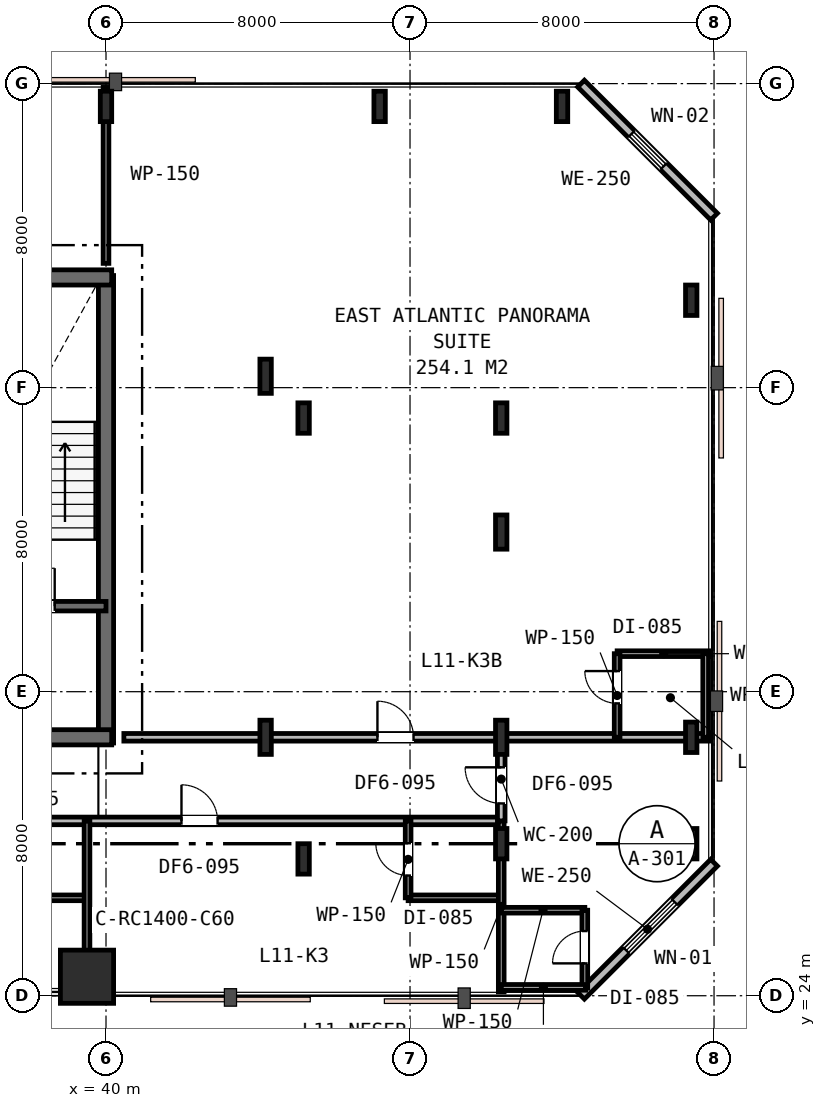
"""IFC4 building model, lengths in metres.
Left out: names, types, materials, properties, quantities, classifications, styles, units other than length and angle.
Written with IfcOpenShell. Run it as: python <this file> out.ifc"""

import sys

from ifc_helpers import new_model, si_unit, direction, frame, frame_2d, origin, origin_2d, place, context, subcontext, project, spatial, rectangle, i_section, extrude, element, fill, save


model = new_model("IFC4")
c1 = context("Model", 3, precision=1e-05, world=origin(), true_north=direction((0.0, 1.0)))
c2 = subcontext(c1, "Body", "Model", "MODEL_VIEW")
j1 = project(units=[si_unit("LENGTHUNIT", "METRE"), si_unit("PLANEANGLEUNIT", "RADIAN")], contexts=[c1])
p1 = place(None, origin())
s1 = spatial("IfcSite", under=j1, at=p1, CompositionType="ELEMENT")
p2 = place(p1, origin())
s2 = spatial("IfcBuilding", under=s1, at=p2, CompositionType="ELEMENT")
p3 = place(p2, frame((0.0, 0.0, 47.4)))
s3 = spatial("IfcBuildingStorey", under=s2, at=p3, CompositionType="ELEMENT", Elevation=47.4)
p4 = place(p3, frame((40.0, 30.65, 0.0), z_axis=(0.0, 0.0, 1.0), x_axis=(0.0, 1.0, 0.0)))
e1 = element("IfcWall", 1, at=p4, inside=s3, PredefinedType="SHEAR", context=c2, shape_type="SweptSolid", body=[
    extrude(rectangle(XDim=12.3, YDim=0.4, at=frame_2d((6.15, 0.0))), origin(), (0.0, 0.0, 1.0), 3.6),
])
p5 = place(p3, frame((15.85, 42.9, 0.0), z_axis=(0.0, 0.0, 1.0), x_axis=(1.0, 0.0, 0.0)))
e2 = element("IfcWall", 2, at=p5, inside=s3, PredefinedType="SHEAR", context=c2, shape_type="SweptSolid", body=[
    extrude(rectangle(XDim=24.3, YDim=0.4, at=frame_2d((12.15, 0.0))), origin(), (0.0, 0.0, 1.0), 3.6),
])
p6 = place(p3, frame((28.95, 30.8, 0.0), z_axis=(0.0, 0.0, 1.0), x_axis=(1.0, 0.0, 0.0)))
e3 = element("IfcWall", 3, at=p6, inside=s3, PredefinedType="SHEAR", context=c2, shape_type="SweptSolid", body=[
    extrude(rectangle(XDim=11.2, YDim=0.4, at=frame_2d((5.6, 0.0))), origin(), (0.0, 0.0, 1.0), 3.6),
])
p7 = place(p6, frame((7.65, 0.0, 0.0)))
e4 = element("IfcOpeningElement", 4, at=p7, cuts=e3, PredefinedType="OPENING", context=c2, shape_type="SweptSolid", body=[
    extrude(rectangle(XDim=1.1, YDim=2.15, at=frame_2d((0.55, 1.075))), frame((0.0, 0.21, 0.0), z_axis=(0.0, -1.0, 0.0), x_axis=(1.0, 0.0, 0.0)), (0.0, 0.0, 1.0), 0.42),
])
p8 = place(p3, frame((33.95, 34.25, 0.0), z_axis=(0.0, 0.0, 1.0), x_axis=(1.0, 0.0, 0.0)))
e5 = element("IfcWall", 5, at=p8, inside=s3, PredefinedType="SHEAR", context=c2, shape_type="SweptSolid", body=[
    extrude(rectangle(XDim=6.05, YDim=0.25, at=frame_2d((3.025, 0.0))), origin(), (0.0, 0.0, 1.0), 3.6),
])
p9 = place(p8, frame((3.7, 0.0, 0.0)))
e6 = element("IfcOpeningElement", 6, at=p9, cuts=e5, PredefinedType="OPENING", context=c2, shape_type="SweptSolid", body=[
    extrude(rectangle(XDim=1.0, YDim=2.15, at=frame_2d((0.5, 1.075))), frame((0.0, 0.135, 0.0), z_axis=(0.0, -1.0, 0.0), x_axis=(1.0, 0.0, 0.0)), (0.0, 0.0, 1.0), 0.27),
])
p10 = place(p8, frame((0.55, 0.0, 0.0)))
e7 = element("IfcOpeningElement", 7, at=p10, cuts=e5, PredefinedType="OPENING", context=c2, shape_type="SweptSolid", body=[
    extrude(rectangle(XDim=1.1, YDim=2.15, at=frame_2d((0.55, 1.075))), frame((0.0, 0.135, 0.0), z_axis=(0.0, -1.0, 0.0), x_axis=(1.0, 0.0, 0.0)), (0.0, 0.0, 1.0), 0.27),
])
p11 = place(p3, frame((39.5, 24.5, 0.0), z_axis=(0.0, 0.0, 1.0), x_axis=(1.0, 0.0, 0.0)))
e8 = element("IfcColumn", 8, at=p11, inside=s3, PredefinedType="COLUMN", context=c2, shape_type="SweptSolid", body=[
    extrude(rectangle(XDim=1.4, YDim=1.4, at=origin_2d()), origin(), (0.0, 0.0, 1.0), 3.6),
])
for number, where, z_axis, x_axis in (
    (9, (45.2, 27.6, 0.0), (0.0, 0.0, 1.0), (1.0, 0.0, 0.0)),
    (10, (45.2, 39.2, 0.0), (0.0, 0.0, 1.0), (1.0, 0.0, 0.0)),
    (11, (40.0, 47.4, 0.0), (0.0, 0.0, 1.0), (1.0, 0.0, 0.0)),
    (12, (47.2, 47.4, 0.0), (0.0, 0.0, 1.0), (1.0, 0.0, 0.0)),
    (13, (50.4, 28.0, 0.0), (0.0, 0.0, 1.0), (1.0, 0.0, 0.0)),
    (14, (50.4, 39.2, 0.0), (0.0, 0.0, 1.0), (1.0, 0.0, 0.0)),
    (15, (55.4, 28.0, 0.0), (0.0, 0.0, 1.0), (1.0, 0.0, 0.0)),
    (16, (55.4, 30.8, 0.0), (0.0, 0.0, 1.0), (1.0, 0.0, 0.0)),
    (17, (55.4, 42.3, 0.0), (0.0, 0.0, 1.0), (1.0, 0.0, 0.0)),
    (18, (52.0, 47.4, 0.0), (0.0, 0.0, 1.0), (1.0, 0.0, 0.0)),
):
    element("IfcColumn", number, at=place(p3, frame(where, z_axis=z_axis, x_axis=x_axis)), inside=s3, PredefinedType="COLUMN", context=c2, shape_type="SweptSolid", body=[
        extrude(i_section(OverallWidth=0.3, OverallDepth=0.8, WebThickness=0.018, FlangeThickness=0.033, FilletRadius=0.03, at=origin_2d()), origin(), (0.0, 0.0, 1.0), 3.6),
    ])
for number, where, z_axis, x_axis in (
    (19, (44.2, 30.8, 0.0), (0.0, 0.0, 1.0), (1.0, 0.0, 0.0)),
    (20, (44.2, 40.3, 0.0), (0.0, 0.0, 1.0), (1.0, 0.0, 0.0)),
    (21, (50.4, 30.8, 0.0), (0.0, 0.0, 1.0), (1.0, 0.0, 0.0)),
    (22, (50.4, 36.2, 0.0), (0.0, 0.0, 1.0), (1.0, 0.0, 0.0)),
):
    element("IfcColumn", number, at=place(p3, frame(where, z_axis=z_axis, x_axis=x_axis)), inside=s3, PredefinedType="COLUMN", context=c2, shape_type="SweptSolid", body=[
        extrude(i_section(OverallWidth=0.3, OverallDepth=0.9, WebThickness=0.018, FlangeThickness=0.035, FilletRadius=0.03, at=origin_2d()), origin(), (0.0, 0.0, 1.0), 3.6),
    ])
p12 = place(p3, frame((52.5, 24.0, 0.0), z_axis=(0.0, 0.0, 1.0), x_axis=(0.707106781187, 0.707106781187, 0.0)))
e23 = element("IfcWall", 23, at=p12, inside=s3, PredefinedType="STANDARD", context=c2, shape_type="SweptSolid", body=[
    extrude(rectangle(XDim=4.95, YDim=0.25, at=frame_2d((2.475, 0.0))), origin(), (0.0, 0.0, 1.0), 3.33),
])
p13 = place(p12, frame((1.685, 0.0, 0.75)))
e24 = element("IfcOpeningElement", 24, at=p13, cuts=e23, PredefinedType="OPENING", context=c2, shape_type="SweptSolid", body=[
    extrude(rectangle(XDim=1.8, YDim=1.85, at=frame_2d((0.9, 0.925))), frame((0.0, 0.135, 0.0), z_axis=(0.0, -1.0, 0.0), x_axis=(1.0, 0.0, 0.0)), (0.0, 0.0, 1.0), 0.27),
])
p14 = place(p3, frame((56.0, 44.5, 0.0), z_axis=(0.0, 0.0, 1.0), x_axis=(-0.707106781187, 0.707106781187, 0.0)))
e25 = element("IfcWall", 25, at=p14, inside=s3, PredefinedType="STANDARD", context=c2, shape_type="SweptSolid", body=[
    extrude(rectangle(XDim=4.95, YDim=0.25, at=frame_2d((2.475, 0.0))), origin(), (0.0, 0.0, 1.0), 3.33),
])
p15 = place(p14, frame((1.875, 0.0, 0.85)))
e26 = element("IfcOpeningElement", 26, at=p15, cuts=e25, PredefinedType="OPENING", context=c2, shape_type="SweptSolid", body=[
    extrude(rectangle(XDim=1.2, YDim=1.6, at=frame_2d((0.6, 0.8))), frame((0.0, 0.135, 0.0), z_axis=(0.0, -1.0, 0.0), x_axis=(1.0, 0.0, 0.0)), (0.0, 0.0, 1.0), 0.27),
])
p16 = place(p3, frame((21.8, 28.6, 0.0), z_axis=(0.0, 0.0, 1.0), x_axis=(1.0, 0.0, 0.0)))
e27 = element("IfcWall", 27, at=p16, inside=s3, PredefinedType="PARTITIONING", context=c2, shape_type="SweptSolid", body=[
    extrude(rectangle(XDim=28.6, YDim=0.2, at=frame_2d((14.3, 0.0))), origin(), (0.0, 0.0, 1.0), 2.82),
])
p17 = place(p16, frame((4.3, 0.0, 0.0)))
e28 = element("IfcOpeningElement", 28, at=p17, cuts=e27, PredefinedType="OPENING", context=c2, shape_type="SweptSolid", body=[
    extrude(rectangle(XDim=0.95, YDim=2.15, at=frame_2d((0.475, 1.075))), frame((0.0, 0.11, 0.0), z_axis=(0.0, -1.0, 0.0), x_axis=(1.0, 0.0, 0.0)), (0.0, 0.0, 1.0), 0.22),
])
p18 = place(p16, frame((12.075, 0.0, 0.0)))
e29 = element("IfcOpeningElement", 29, at=p18, cuts=e27, PredefinedType="OPENING", context=c2, shape_type="SweptSolid", body=[
    extrude(rectangle(XDim=0.95, YDim=2.15, at=frame_2d((0.475, 1.075))), frame((0.0, 0.11, 0.0), z_axis=(0.0, -1.0, 0.0), x_axis=(1.0, 0.0, 0.0)), (0.0, 0.0, 1.0), 0.22),
])
p19 = place(p16, frame((20.186, 0.0, 0.0)))
e30 = element("IfcOpeningElement", 30, at=p19, cuts=e27, PredefinedType="OPENING", context=c2, shape_type="SweptSolid", body=[
    extrude(rectangle(XDim=0.95, YDim=2.15, at=frame_2d((0.475, 1.075))), frame((0.0, 0.11, 0.0), z_axis=(0.0, -1.0, 0.0), x_axis=(1.0, 0.0, 0.0)), (0.0, 0.0, 1.0), 0.22),
])
p20 = place(p3, frame((40.0, 43.27, 0.0), z_axis=(0.0, 0.0, 1.0), x_axis=(0.0, 1.0, 0.0)))
e31 = element("IfcWall", 31, at=p20, inside=s3, PredefinedType="PARTITIONING", context=c2, shape_type="SweptSolid", body=[
    extrude(rectangle(XDim=4.63, YDim=0.15, at=frame_2d((2.315, 0.0))), origin(), (0.0, 0.0, 1.0), 2.93),
])
p21 = place(p3, frame((37.05, 26.576, 0.0), z_axis=(0.0, 0.0, 1.0), x_axis=(1.0, 0.0, 0.0)))
e32 = element("IfcWall", 32, at=p21, inside=s3, PredefinedType="PARTITIONING", context=c2, shape_type="SweptSolid", body=[
    extrude(rectangle(XDim=2.45, YDim=0.15, at=frame_2d((1.225, 0.0))), origin(), (0.0, 0.0, 1.0), 2.82),
])
p22 = place(p3, frame((39.5, 28.6, 0.0), z_axis=(0.0, 0.0, 1.0), x_axis=(0.0, -1.0, 0.0)))
e33 = element("IfcWall", 33, at=p22, inside=s3, PredefinedType="PARTITIONING", context=c2, shape_type="SweptSolid", body=[
    extrude(rectangle(XDim=4.5, YDim=0.15, at=frame_2d((2.25, 0.0))), origin(), (0.0, 0.0, 1.0), 2.82),
])
p23 = place(p3, frame((47.95, 26.576, 0.0), z_axis=(0.0, 0.0, 1.0), x_axis=(1.0, 0.0, 0.0)))
e34 = element("IfcWall", 34, at=p23, inside=s3, PredefinedType="PARTITIONING", context=c2, shape_type="SweptSolid", body=[
    extrude(rectangle(XDim=2.45, YDim=0.15, at=frame_2d((1.225, 0.0))), origin(), (0.0, 0.0, 1.0), 3.33),
])
p24 = place(p3, frame((47.95, 26.576, 0.0), z_axis=(0.0, 0.0, 1.0), x_axis=(0.0, 1.0, 0.0)))
e35 = element("IfcWall", 35, at=p24, inside=s3, PredefinedType="PARTITIONING", context=c2, shape_type="SweptSolid", body=[
    extrude(rectangle(XDim=2.024, YDim=0.15, at=frame_2d((1.012, 0.0))), origin(), (0.0, 0.0, 1.0), 3.33),
])
p25 = place(p24, frame((0.587, 0.0, 0.0)))
e36 = element("IfcOpeningElement", 36, at=p25, cuts=e35, PredefinedType="OPENING", context=c2, shape_type="SweptSolid", body=[
    extrude(rectangle(XDim=0.85, YDim=2.15, at=frame_2d((0.425, 1.075))), frame((0.0, 0.085, 0.0), z_axis=(0.0, -1.0, 0.0), x_axis=(1.0, 0.0, 0.0)), (0.0, 0.0, 1.0), 0.17),
])
p26 = place(p3, frame((50.4, 28.6, 0.0), z_axis=(0.0, 0.0, 1.0), x_axis=(0.0, -1.0, 0.0)))
e37 = element("IfcWall", 37, at=p26, inside=s3, PredefinedType="PARTITIONING", context=c2, shape_type="SweptSolid", body=[
    extrude(rectangle(XDim=4.5, YDim=0.15, at=frame_2d((2.25, 0.0))), origin(), (0.0, 0.0, 1.0), 2.82),
])
p27 = place(p3, frame((40.47, 30.8, 0.0), z_axis=(0.0, 0.0, 1.0), x_axis=(1.0, 0.0, 0.0)))
e38 = element("IfcWall", 38, at=p27, inside=s3, PredefinedType="PARTITIONING", context=c2, shape_type="SweptSolid", body=[
    extrude(rectangle(XDim=15.43, YDim=0.2, at=frame_2d((7.715, 0.0))), origin(), (0.0, 0.0, 1.0), 2.82),
])
p28 = place(p27, frame((6.673, 0.0, 0.0)))
e39 = element("IfcOpeningElement", 39, at=p28, cuts=e38, PredefinedType="OPENING", context=c2, shape_type="SweptSolid", body=[
    extrude(rectangle(XDim=0.95, YDim=2.15, at=frame_2d((0.475, 1.075))), frame((0.0, 0.11, 0.0), z_axis=(0.0, -1.0, 0.0), x_axis=(1.0, 0.0, 0.0)), (0.0, 0.0, 1.0), 0.22),
])
p29 = place(p3, frame((53.45, 33.0, 0.0), z_axis=(0.0, 0.0, 1.0), x_axis=(1.0, 0.0, 0.0)))
e40 = element("IfcWall", 40, at=p29, inside=s3, PredefinedType="PARTITIONING", context=c2, shape_type="SweptSolid", body=[
    extrude(rectangle(XDim=2.45, YDim=0.15, at=frame_2d((1.225, 0.0))), origin(), (0.0, 0.0, 1.0), 2.93),
])
p30 = place(p3, frame((53.45, 30.8, 0.0), z_axis=(0.0, 0.0, 1.0), x_axis=(0.0, 1.0, 0.0)))
e41 = element("IfcWall", 41, at=p30, inside=s3, PredefinedType="PARTITIONING", context=c2, shape_type="SweptSolid", body=[
    extrude(rectangle(XDim=2.2, YDim=0.15, at=frame_2d((1.1, 0.0))), origin(), (0.0, 0.0, 1.0), 2.82),
])
p31 = place(p30, frame((0.892, 0.0, 0.0)))
e42 = element("IfcOpeningElement", 42, at=p31, cuts=e41, PredefinedType="OPENING", context=c2, shape_type="SweptSolid", body=[
    extrude(rectangle(XDim=0.85, YDim=2.15, at=frame_2d((0.425, 1.075))), frame((0.0, 0.085, 0.0), z_axis=(0.0, -1.0, 0.0), x_axis=(1.0, 0.0, 0.0)), (0.0, 0.0, 1.0), 0.17),
])
p32 = place(p3, frame((55.78, 33.0, 0.0), z_axis=(0.0, 0.0, 1.0), x_axis=(0.0, -1.0, 0.0)))
e43 = element("IfcWall", 43, at=p32, inside=s3, PredefinedType="PARTITIONING", context=c2, shape_type="SweptSolid", body=[
    extrude(rectangle(XDim=2.2, YDim=0.15, at=frame_2d((1.1, 0.0))), origin(), (0.0, 0.0, 1.0), 2.82),
])
p33 = place(p3, frame((50.4, 28.6, 0.0), z_axis=(0.0, 0.0, 1.0), x_axis=(0.0, 1.0, 0.0)))
e44 = element("IfcWall", 44, at=p33, inside=s3, PredefinedType="PARTITIONING", context=c2, shape_type="SweptSolid", body=[
    extrude(rectangle(XDim=2.2, YDim=0.2, at=frame_2d((1.1, 0.0))), origin(), (0.0, 0.0, 1.0), 2.82),
])
p34 = place(p33, frame((0.46, 0.0, 0.0)))
e45 = element("IfcOpeningElement", 45, at=p34, cuts=e44, PredefinedType="OPENING", context=c2, shape_type="SweptSolid", body=[
    extrude(rectangle(XDim=0.95, YDim=2.15, at=frame_2d((0.475, 1.075))), frame((0.0, 0.11, 0.0), z_axis=(0.0, -1.0, 0.0), x_axis=(1.0, 0.0, 0.0)), (0.0, 0.0, 1.0), 0.22),
])
p35 = place(p3, frame((50.4, 26.25, 0.0), z_axis=(0.0, 0.0, 1.0), x_axis=(1.0, 0.0, 0.0)))
e46 = element("IfcWall", 46, at=p35, inside=s3, PredefinedType="PARTITIONING", context=c2, shape_type="SweptSolid", body=[
    extrude(rectangle(XDim=2.2, YDim=0.15, at=frame_2d((1.1, 0.0))), origin(), (0.0, 0.0, 1.0), 3.33),
])
p36 = place(p3, frame((52.6, 24.2, 0.0), z_axis=(0.0, 0.0, 1.0), x_axis=(0.0, 1.0, 0.0)))
e47 = element("IfcWall", 47, at=p36, inside=s3, PredefinedType="PARTITIONING", context=c2, shape_type="SweptSolid", body=[
    extrude(rectangle(XDim=2.05, YDim=0.15, at=frame_2d((1.025, 0.0))), origin(), (0.0, 0.0, 1.0), 3.33),
])
p37 = place(p36, frame((0.651, 0.0, 0.0)))
e48 = element("IfcOpeningElement", 48, at=p37, cuts=e47, PredefinedType="OPENING", context=c2, shape_type="SweptSolid", body=[
    extrude(rectangle(XDim=0.85, YDim=2.15, at=frame_2d((0.425, 1.075))), frame((0.0, 0.085, 0.0), z_axis=(0.0, -1.0, 0.0), x_axis=(1.0, 0.0, 0.0)), (0.0, 0.0, 1.0), 0.17),
])
p38 = place(p3, frame((52.62, 24.22, 0.0), z_axis=(0.0, 0.0, 1.0), x_axis=(-1.0, 0.0, 0.0)))
e49 = element("IfcWall", 49, at=p38, inside=s3, PredefinedType="PARTITIONING", context=c2, shape_type="SweptSolid", body=[
    extrude(rectangle(XDim=2.22, YDim=0.15, at=frame_2d((1.11, 0.0))), origin(), (0.0, 0.0, 1.0), 3.33),
])
p39 = place(p13, origin())
e50 = element("IfcWindow", 50, at=p39, inside=s3, PartitioningType="SINGLE_PANEL", PredefinedType="WINDOW", context=c2, shape_type="SweptSolid", body=[
    extrude(rectangle(XDim=1.8, YDim=1.85, at=frame_2d((0.9, 0.925))), frame((0.0, 0.03, 0.0), z_axis=(0.0, -1.0, 0.0), x_axis=(1.0, 0.0, 0.0)), (0.0, 0.0, 1.0), 0.06),
])
fill(e24, e50)
p40 = place(p15, origin())
e51 = element("IfcWindow", 51, at=p40, inside=s3, PartitioningType="SINGLE_PANEL", PredefinedType="WINDOW", context=c2, shape_type="SweptSolid", body=[
    extrude(rectangle(XDim=1.2, YDim=1.6, at=frame_2d((0.6, 0.8))), frame((0.0, 0.03, 0.0), z_axis=(0.0, -1.0, 0.0), x_axis=(1.0, 0.0, 0.0)), (0.0, 0.0, 1.0), 0.06),
])
fill(e26, e51)
p41 = place(p9, origin())
e52 = element("IfcDoor", 52, at=p41, inside=s3, OperationType="SINGLE_SWING_RIGHT", PredefinedType="DOOR", context=c2, shape_type="SweptSolid", body=[
    extrude(rectangle(XDim=1.0, YDim=2.15, at=frame_2d((0.5, 1.075))), frame((0.0, 0.025, 0.0), z_axis=(0.0, -1.0, 0.0), x_axis=(1.0, 0.0, 0.0)), (0.0, 0.0, 1.0), 0.05),
])
fill(e6, e52)
p42 = place(p19, origin())
e53 = element("IfcDoor", 53, at=p42, inside=s3, OperationType="SINGLE_SWING_LEFT", PredefinedType="DOOR", context=c2, shape_type="SweptSolid", body=[
    extrude(rectangle(XDim=0.95, YDim=2.15, at=frame_2d((0.475, 1.075))), frame((0.0, 0.025, 0.0), z_axis=(0.0, -1.0, 0.0), x_axis=(1.0, 0.0, 0.0)), (0.0, 0.0, 1.0), 0.05),
])
fill(e30, e53)
p43 = place(p25, origin())
e54 = element("IfcDoor", 54, at=p43, inside=s3, OperationType="SINGLE_SWING_RIGHT", PredefinedType="DOOR", context=c2, shape_type="SweptSolid", body=[
    extrude(rectangle(XDim=0.85, YDim=2.15, at=frame_2d((0.425, 1.075))), frame((0.0, 0.025, 0.0), z_axis=(0.0, -1.0, 0.0), x_axis=(1.0, 0.0, 0.0)), (0.0, 0.0, 1.0), 0.05),
])
fill(e36, e54)
p44 = place(p28, origin())
e55 = element("IfcDoor", 55, at=p44, inside=s3, OperationType="SINGLE_SWING_LEFT", PredefinedType="DOOR", context=c2, shape_type="SweptSolid", body=[
    extrude(rectangle(XDim=0.95, YDim=2.15, at=frame_2d((0.475, 1.075))), frame((0.0, 0.025, 0.0), z_axis=(0.0, -1.0, 0.0), x_axis=(1.0, 0.0, 0.0)), (0.0, 0.0, 1.0), 0.05),
])
fill(e39, e55)
p45 = place(p31, origin())
e56 = element("IfcDoor", 56, at=p45, inside=s3, OperationType="SINGLE_SWING_RIGHT", PredefinedType="DOOR", context=c2, shape_type="SweptSolid", body=[
    extrude(rectangle(XDim=0.85, YDim=2.15, at=frame_2d((0.425, 1.075))), frame((0.0, 0.025, 0.0), z_axis=(0.0, -1.0, 0.0), x_axis=(1.0, 0.0, 0.0)), (0.0, 0.0, 1.0), 0.05),
])
fill(e42, e56)
p46 = place(p34, origin())
e57 = element("IfcDoor", 57, at=p46, inside=s3, OperationType="SINGLE_SWING_RIGHT", PredefinedType="DOOR", context=c2, shape_type="SweptSolid", body=[
    extrude(rectangle(XDim=0.95, YDim=2.15, at=frame_2d((0.475, 1.075))), frame((0.0, 0.025, 0.0), z_axis=(0.0, -1.0, 0.0), x_axis=(1.0, 0.0, 0.0)), (0.0, 0.0, 1.0), 0.05),
])
fill(e45, e57)
p47 = place(p37, origin())
e58 = element("IfcDoor", 58, at=p47, inside=s3, OperationType="SINGLE_SWING_LEFT", PredefinedType="DOOR", context=c2, shape_type="SweptSolid", body=[
    extrude(rectangle(XDim=0.85, YDim=2.15, at=frame_2d((0.425, 1.075))), frame((0.0, 0.025, 0.0), z_axis=(0.0, -1.0, 0.0), x_axis=(1.0, 0.0, 0.0)), (0.0, 0.0, 1.0), 0.05),
])
fill(e48, e58)
save(model, sys.argv[1])
